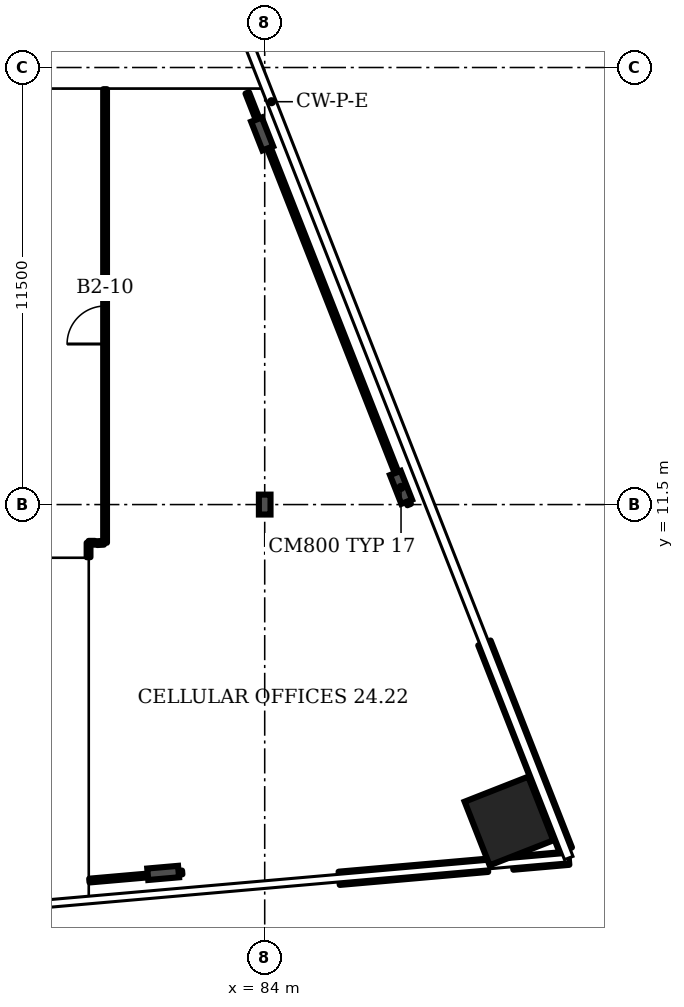
"""IFC4 building model, lengths in metres.
Left out: names, types, materials, properties, quantities, classifications, styles, units other than length and angle.
Written with IfcOpenShell. Run it as: python <this file> out.ifc"""

import sys

from ifc_helpers import new_model, si_unit, direction, frame, frame_2d, origin, origin_2d, place, context, subcontext, project, spatial, rectangle, i_section, extrude, element, fill, save


model = new_model("IFC4")
c1 = context("Model", 3, precision=1e-05, world=origin(), true_north=direction((0.0, 1.0)))
c2 = subcontext(c1, "Body", "Model", "MODEL_VIEW")
j1 = project(units=[si_unit("LENGTHUNIT", "METRE"), si_unit("PLANEANGLEUNIT", "RADIAN")], contexts=[c1])
p1 = place(None, origin())
s1 = spatial("IfcSite", under=j1, at=p1, CompositionType="ELEMENT")
p2 = place(p1, origin())
s2 = spatial("IfcBuilding", under=s1, at=p2, CompositionType="ELEMENT")
p3 = place(p2, frame((0.0, 0.0, 107.5)))
s3 = spatial("IfcBuildingStorey", under=s2, at=p3, CompositionType="ELEMENT", Elevation=107.5)
p4 = place(p3, frame((90.427, 3.174, 0.0), z_axis=(0.0, 0.0, 1.0), x_axis=(-0.365778, 0.930702, 0.0)))
e1 = element("IfcColumn", 1, at=p4, inside=s3, PredefinedType="COLUMN", context=c2, shape_type="SweptSolid", body=[
    extrude(rectangle(XDim=1.8, YDim=1.8, at=origin_2d()), origin(), (0.0, 0.0, 1.0), 3.6),
])
for number, where, z_axis, x_axis in (
    (2, (81.328, 1.808, 0.0), (0.0, 0.0, 1.0), (0.087, -0.996, 0.0)),
    (3, (87.587, 11.952, 0.0), (0.0, 0.0, 1.0), (0.931, 0.366, 0.0)),
    (4, (83.933, 21.251, 0.0), (0.0, 0.0, 1.0), (0.931, 0.366, 0.0)),
):
    element("IfcColumn", number, at=place(p3, frame(where, z_axis=z_axis, x_axis=x_axis)), inside=s3, PredefinedType="COLUMN", context=c2, shape_type="SweptSolid", body=[
        extrude(i_section(OverallWidth=0.303, OverallDepth=0.814, WebThickness=0.021, FlangeThickness=0.04, FilletRadius=0.03, at=origin_2d()), origin(), (0.0, 0.0, 1.0), 3.6),
    ])
p5 = place(p3, frame((84.0, 11.5, 0.0), z_axis=(0.0, 0.0, 1.0), x_axis=(1.0, 0.0, 0.0)))
e5 = element("IfcColumn", 5, at=p5, inside=s3, PredefinedType="COLUMN", context=c2, shape_type="SweptSolid", body=[
    extrude(i_section(OverallWidth=0.306, OverallDepth=0.524, WebThickness=0.021, FlangeThickness=0.04, FilletRadius=0.027, at=origin_2d()), origin(), (0.0, 0.0, 1.0), 3.6),
])
p6 = place(p3, frame((85.959, 1.667, 0.0), z_axis=(0.0, 0.0, 1.0), x_axis=(0.996194, 0.087167, 0.0)))
e6 = element("IfcWall", 6, at=p6, inside=s3, PredefinedType="SOLIDWALL", context=c2, shape_type="SweptSolid", body=[
    extrude(rectangle(XDim=3.921, YDim=0.35, at=frame_2d((1.96, 0.0))), origin(), (0.0, 0.0, 1.0), 1.0),
])
p7 = place(p3, frame((90.527, 2.066, 0.0), z_axis=(0.0, 0.0, 1.0), x_axis=(0.996198, 0.087157, 0.0)))
e7 = element("IfcWall", 7, at=p7, inside=s3, PredefinedType="SOLIDWALL", context=c2, shape_type="SweptSolid", body=[
    extrude(rectangle(XDim=1.479, YDim=0.35, at=frame_2d((0.74, 0.0))), origin(), (0.0, 0.0, 1.0), 1.0),
])
p8 = place(p3, frame((91.921, 2.414, 0.0), z_axis=(0.0, 0.0, 1.0), x_axis=(-0.36578, 0.930701, 0.0)))
e8 = element("IfcWall", 8, at=p8, inside=s3, PredefinedType="SOLIDWALL", context=c2, shape_type="SweptSolid", body=[
    extrude(rectangle(XDim=5.852, YDim=0.35, at=frame_2d((2.926, 0.0))), origin(), (0.0, 0.0, 1.0), 1.0),
])
p9 = place(p3, frame((79.365, 10.115, 0.0), z_axis=(0.0, 0.0, 1.0), x_axis=(0.0, 1.0, 0.0)))
e9 = element("IfcWall", 9, at=p9, inside=s3, PredefinedType="PARTITIONING", context=c2, shape_type="SweptSolid", body=[
    extrude(rectangle(XDim=0.38, YDim=0.1, at=frame_2d((0.19, 0.0))), origin(), (0.0, 0.0, 1.0), 3.2),
])
p10 = place(p3, frame((79.365, 10.495, 0.0), z_axis=(0.0, 0.0, 1.0), x_axis=(1.0, 0.0, 0.0)))
e10 = element("IfcWall", 10, at=p10, inside=s3, PredefinedType="PARTITIONING", context=c2, shape_type="SweptSolid", body=[
    extrude(rectangle(XDim=0.17, YDim=0.1, at=frame_2d((0.085, 0.0))), origin(), (0.0, 0.0, 1.0), 3.2),
])
p11 = place(p3, frame((79.386, 1.607, 0.0), z_axis=(0.0, 0.0, 1.0), x_axis=(0.996209, 0.086973, 0.0)))
e11 = element("IfcWall", 11, at=p11, inside=s3, PredefinedType="PARTITIONING", context=c2, shape_type="SweptSolid", body=[
    extrude(rectangle(XDim=2.453, YDim=0.1, at=frame_2d((1.227, 0.0))), origin(), (0.0, 0.0, 1.0), 2.58),
])
p12 = place(p3, frame((79.59, 10.485, 0.0), z_axis=(0.0, 0.0, 1.0), x_axis=(0.998455, 0.055545, 0.0)))
e12 = element("IfcWall", 12, at=p12, inside=s3, PredefinedType="PARTITIONING", context=c2, shape_type="SweptSolid", body=[
    extrude(rectangle(XDim=0.18, YDim=0.1, at=frame_2d((0.09, 0.0))), origin(), (0.0, 0.0, 1.0), 3.2),
])
p13 = place(p3, frame((79.8, 10.495, 0.0), z_axis=(0.0, 0.0, 1.0), x_axis=(0.0, 1.0, 0.0)))
e13 = element("IfcWall", 13, at=p13, inside=s3, PredefinedType="PARTITIONING", context=c2, shape_type="SweptSolid", body=[
    extrude(rectangle(XDim=11.935, YDim=0.1, at=frame_2d((5.967, 0.0))), origin(), (0.0, 0.0, 1.0), 3.2),
])
p14 = place(p13, frame((5.23, 0.0, 0.0)))
e14 = element("IfcOpeningElement", 14, at=p14, cuts=e13, PredefinedType="OPENING", context=c2, shape_type="SweptSolid", body=[
    extrude(rectangle(XDim=1.0, YDim=2.1, at=frame_2d((0.5, 1.05))), frame((0.0, 0.06, 0.0), z_axis=(0.0, -1.0, 0.0), x_axis=(1.0, 0.0, 0.0)), (0.0, 0.0, 1.0), 0.12),
])
p15 = place(p3, frame((83.96, 21.265, 0.0), z_axis=(0.0, 0.0, 1.0), x_axis=(-0.364889, 0.931052, 0.0)))
e15 = element("IfcWall", 15, at=p15, inside=s3, PredefinedType="PARTITIONING", context=c2, shape_type="SweptSolid", body=[
    extrude(rectangle(XDim=1.147, YDim=0.1, at=frame_2d((0.574, 0.0))), origin(), (0.0, 0.0, 1.0), 2.58),
])
p16 = place(p3, frame((87.8, 11.5, 0.0), z_axis=(0.0, 0.0, 1.0), x_axis=(-0.365945, 0.930635, 0.0)))
e16 = element("IfcWall", 16, at=p16, inside=s3, PredefinedType="PARTITIONING", context=c2, shape_type="SweptSolid", body=[
    extrude(rectangle(XDim=10.464, YDim=0.1, at=frame_2d((5.232, 0.0))), origin(), (0.0, 0.0, 1.0), 2.58),
])
p17 = place(p14, origin())
e17 = element("IfcDoor", 17, at=p17, inside=s3, OperationType="SINGLE_SWING_LEFT", PredefinedType="DOOR", context=c2, shape_type="SweptSolid", body=[
    extrude(rectangle(XDim=1.0, YDim=2.1, at=frame_2d((0.5, 1.05))), frame((0.0, 0.025, 0.0), z_axis=(0.0, -1.0, 0.0), x_axis=(1.0, 0.0, 0.0)), (0.0, 0.0, 1.0), 0.05),
])
fill(e14, e17)
save(model, sys.argv[1])
